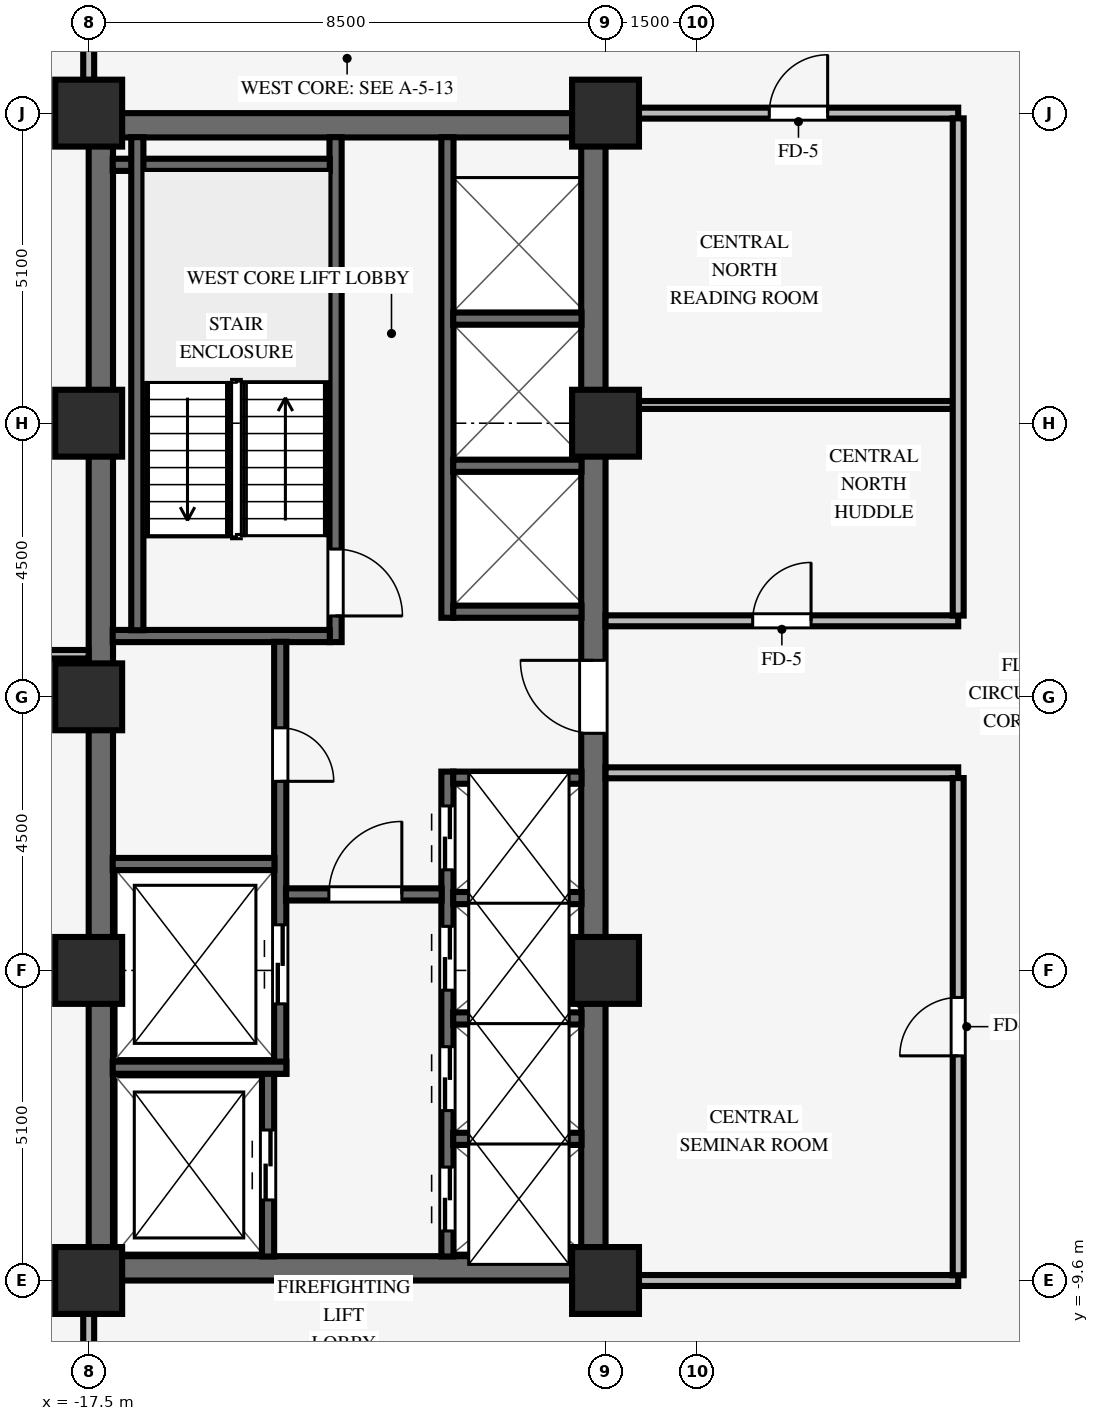
"""IFC4 building model, lengths in metres.
Left out: names, types, materials, properties, quantities, classifications, styles, units other than length and angle.
Written with IfcOpenShell. Run it as: python <this file> out.ifc"""

import sys

from ifc_helpers import new_model, si_unit, direction, frame, frame_2d, origin, origin_2d, place, context, subcontext, project, spatial, rectangle, extrude, source, transform, mapped, element, fill, save


model = new_model("IFC4")
c1 = context("Model", 3, precision=1e-05, world=origin(), true_north=direction((0.0, 1.0)))
c2 = subcontext(c1, "Body", "Model", "MODEL_VIEW")
j1 = project(units=[si_unit("LENGTHUNIT", "METRE"), si_unit("PLANEANGLEUNIT", "RADIAN")], contexts=[c1])
p1 = place(None, origin())
s1 = spatial("IfcSite", under=j1, at=p1, CompositionType="ELEMENT")
p2 = place(p1, origin())
s2 = spatial("IfcBuilding", under=s1, at=p2, CompositionType="ELEMENT")
p3 = place(p2, frame((0.0, 0.0, 101.95)))
s3 = spatial("IfcBuildingStorey", under=s2, at=p3, CompositionType="ELEMENT", Elevation=101.95)
for number, where, z_axis, x_axis in (
    (1, (-17.5, -9.4, 0.0), (0.0, 0.0, 1.0), (1.0, 0.0, 0.0)),
    (2, (-17.5, 9.4, 0.0), (0.0, 0.0, 1.0), (1.0, 0.0, 0.0)),
):
    element("IfcWall", number, at=place(p3, frame(where, z_axis=z_axis, x_axis=x_axis)), inside=s3, PredefinedType="SHEAR", context=c2, shape_type="SweptSolid", body=[
        extrude(rectangle(XDim=8.5, YDim=0.4, at=frame_2d((4.25, 0.0))), origin(), (0.0, 0.0, 1.0), 3.37),
    ])
p4 = place(p3, frame((-17.3, -9.205, 0.0), z_axis=(0.0, 0.0, 1.0), x_axis=(0.0, 1.0, 0.0)))
e3 = element("IfcWall", 3, at=p4, inside=s3, PredefinedType="SHEAR", context=c2, shape_type="SweptSolid", body=[
    extrude(rectangle(XDim=18.41, YDim=0.4, at=frame_2d((9.205, 0.0))), origin(), (0.0, 0.0, 1.0), 3.37),
])
p5 = place(p3, frame((-9.2, -9.205, 0.0), z_axis=(0.0, 0.0, 1.0), x_axis=(0.0, 1.0, 0.0)))
e4 = element("IfcWall", 4, at=p5, inside=s3, PredefinedType="SHEAR", context=c2, shape_type="SweptSolid", body=[
    extrude(rectangle(XDim=18.41, YDim=0.4, at=frame_2d((9.205, 0.0))), origin(), (0.0, 0.0, 1.0), 3.37),
])
p6 = place(p5, frame((8.605, 0.0, 0.0)))
e5 = element("IfcOpeningElement", 5, at=p6, cuts=e4, PredefinedType="OPENING", context=c2, shape_type="SweptSolid", body=[
    extrude(rectangle(XDim=1.2, YDim=2.15, at=frame_2d((0.6, 1.075))), frame((0.0, 0.21, 0.0), z_axis=(0.0, -1.0, 0.0), x_axis=(1.0, 0.0, 0.0)), (0.0, 0.0, 1.0), 0.42),
])
for number, where, z_axis, x_axis in (
    (6, (-17.5, -9.6, 0.0), (0.0, 0.0, 1.0), (1.0, 0.0, 0.0)),
    (7, (-17.5, -4.5, 0.0), (0.0, 0.0, 1.0), (1.0, 0.0, 0.0)),
    (8, (-17.5, 4.5, 0.0), (0.0, 0.0, 1.0), (1.0, 0.0, 0.0)),
    (9, (-17.5, 9.6, 0.0), (0.0, 0.0, 1.0), (1.0, 0.0, 0.0)),
    (10, (-9.0, -9.6, 0.0), (0.0, 0.0, 1.0), (1.0, 0.0, 0.0)),
    (11, (-9.0, -4.5, 0.0), (0.0, 0.0, 1.0), (1.0, 0.0, 0.0)),
    (12, (-9.0, 4.5, 0.0), (0.0, 0.0, 1.0), (1.0, 0.0, 0.0)),
    (13, (-9.0, 9.6, 0.0), (0.0, 0.0, 1.0), (1.0, 0.0, 0.0)),
    (14, (-17.5, 0.0, 0.0), (0.0, 0.0, 1.0), (1.0, 0.0, 0.0)),
):
    element("IfcColumn", number, at=place(p3, frame(where, z_axis=z_axis, x_axis=x_axis)), inside=s3, PredefinedType="COLUMN", context=c2, shape_type="SweptSolid", body=[
        extrude(rectangle(XDim=1.1, YDim=1.1, at=origin_2d()), origin(), (0.0, 0.0, 1.0), 3.37),
    ])
p7 = place(p3, frame((-13.44, 0.9, 0.0), z_axis=(0.0, 0.0, 1.0), x_axis=(0.0, 1.0, 0.0)))
e15 = element("IfcWall", 15, at=p7, inside=s3, PredefinedType="SHEAR", context=c2, shape_type="SweptSolid", body=[
    extrude(rectangle(XDim=8.305, YDim=0.2, at=frame_2d((4.153, 0.0))), origin(), (0.0, 0.0, 1.0), 3.37),
])
p8 = place(p7, frame((1.53, 0.0, 0.0), z_axis=(0.0, 0.0, 1.0), x_axis=(-1.0, 0.0, 0.0)))
e16 = element("IfcOpeningElement", 16, at=p8, cuts=e15, PredefinedType="OPENING", context=c2, shape_type="SweptSolid", body=[
    extrude(rectangle(XDim=1.1, YDim=2.15, at=frame_2d((0.55, 1.075))), frame((0.0, 0.11, 0.0), z_axis=(0.0, -1.0, 0.0), x_axis=(1.0, 0.0, 0.0)), (0.0, 0.0, 1.0), 0.22),
])
for number, where, z_axis, x_axis in (
    (17, (-17.105, 1.0, 0.0), (0.0, 0.0, 1.0), (1.0, 0.0, 0.0)),
    (18, (-17.105, 8.75, 0.0), (0.0, 0.0, 1.0), (1.0, 0.0, 0.0)),
):
    element("IfcWall", number, at=place(p3, frame(where, z_axis=z_axis, x_axis=x_axis)), inside=s3, PredefinedType="SHEAR", context=c2, shape_type="SweptSolid", body=[
        extrude(rectangle(XDim=3.57, YDim=0.2, at=frame_2d((1.785, 0.0))), origin(), (0.0, 0.0, 1.0), 3.37),
    ])
p9 = place(p3, frame((-16.7, 1.095, 0.0), z_axis=(0.0, 0.0, 1.0), x_axis=(0.0, 1.0, 0.0)))
e19 = element("IfcWall", 19, at=p9, inside=s3, PredefinedType="SHEAR", context=c2, shape_type="SweptSolid", body=[
    extrude(rectangle(XDim=8.11, YDim=0.2, at=frame_2d((4.055, 0.0))), origin(), (0.0, 0.0, 1.0), 3.37),
])
p10 = place(p3, frame((-14.55, -9.205, 0.0), z_axis=(0.0, 0.0, 1.0), x_axis=(0.0, 1.0, 0.0)))
e20 = element("IfcWall", 20, at=p10, inside=s3, PredefinedType="SHEAR", context=c2, shape_type="SweptSolid", body=[
    extrude(rectangle(XDim=3.01, YDim=0.2, at=frame_2d((1.505, 0.0))), origin(), (0.0, 0.0, 1.0), 3.37),
])
p11 = place(p10, frame((0.93, 0.0, 0.0)))
e21 = element("IfcOpeningElement", 21, at=p11, cuts=e20, PredefinedType="OPENING", context=c2, shape_type="SweptSolid", body=[
    extrude(rectangle(XDim=1.15, YDim=2.15, at=frame_2d((0.575, 1.075))), frame((0.0, 0.11, 0.0), z_axis=(0.0, -1.0, 0.0), x_axis=(1.0, 0.0, 0.0)), (0.0, 0.0, 1.0), 0.22),
])
p12 = place(p3, frame((-14.35, -6.2, 0.0), z_axis=(0.0, 0.0, 1.0), x_axis=(0.0, 1.0, 0.0)))
e22 = element("IfcWall", 22, at=p12, inside=s3, PredefinedType="SHEAR", context=c2, shape_type="SweptSolid", body=[
    extrude(rectangle(XDim=7.105, YDim=0.2, at=frame_2d((3.552, 0.0))), origin(), (0.0, 0.0, 1.0), 3.37),
])
p13 = place(p12, frame((5.69, 0.0, 0.0), z_axis=(0.0, 0.0, 1.0), x_axis=(-1.0, 0.0, 0.0)))
e23 = element("IfcOpeningElement", 23, at=p13, cuts=e22, PredefinedType="OPENING", context=c2, shape_type="SweptSolid", body=[
    extrude(rectangle(XDim=0.88, YDim=2.1, at=frame_2d((0.44, 1.05))), frame((0.0, 0.11, 0.0), z_axis=(0.0, -1.0, 0.0), x_axis=(1.0, 0.0, 0.0)), (0.0, 0.0, 1.0), 0.22),
])
p14 = place(p12, frame((1.15, 0.0, 0.0)))
e24 = element("IfcOpeningElement", 24, at=p14, cuts=e22, PredefinedType="OPENING", context=c2, shape_type="SweptSolid", body=[
    extrude(rectangle(XDim=1.3, YDim=2.2, at=frame_2d((0.65, 1.1))), frame((0.0, 0.11, 0.0), z_axis=(0.0, -1.0, 0.0), x_axis=(1.0, 0.0, 0.0)), (0.0, 0.0, 1.0), 0.22),
])
p15 = place(p3, frame((-17.105, -6.1, 0.0), z_axis=(0.0, 0.0, 1.0), x_axis=(1.0, 0.0, 0.0)))
e25 = element("IfcWall", 25, at=p15, inside=s3, PredefinedType="SHEAR", context=c2, shape_type="SweptSolid", body=[
    extrude(rectangle(XDim=2.855, YDim=0.2, at=frame_2d((1.427, 0.0))), origin(), (0.0, 0.0, 1.0), 3.37),
])
p16 = place(p3, frame((-17.105, -2.75, 0.0), z_axis=(0.0, 0.0, 1.0), x_axis=(1.0, 0.0, 0.0)))
e26 = element("IfcWall", 26, at=p16, inside=s3, PredefinedType="SHEAR", context=c2, shape_type="SweptSolid", body=[
    extrude(rectangle(XDim=2.66, YDim=0.2, at=frame_2d((1.33, 0.0))), origin(), (0.0, 0.0, 1.0), 3.37),
])
p17 = place(p3, frame((-11.6, -9.205, 0.0), z_axis=(0.0, 0.0, 1.0), x_axis=(0.0, 1.0, 0.0)))
e27 = element("IfcWall", 27, at=p17, inside=s3, PredefinedType="SHEAR", context=c2, shape_type="SweptSolid", body=[
    extrude(rectangle(XDim=7.975, YDim=0.2, at=frame_2d((3.988, 0.0))), origin(), (0.0, 0.0, 1.0), 3.37),
])
p18 = place(p17, frame((0.42, 0.0, 0.0)))
e28 = element("IfcOpeningElement", 28, at=p18, cuts=e27, PredefinedType="OPENING", context=c2, shape_type="SweptSolid", body=[
    extrude(rectangle(XDim=1.05, YDim=2.15, at=frame_2d((0.525, 1.075))), frame((0.0, 0.11, 0.0), z_axis=(0.0, -1.0, 0.0), x_axis=(1.0, 0.0, 0.0)), (0.0, 0.0, 1.0), 0.22),
])
p19 = place(p17, frame((2.4, 0.0, 0.0)))
e29 = element("IfcOpeningElement", 29, at=p19, cuts=e27, PredefinedType="OPENING", context=c2, shape_type="SweptSolid", body=[
    extrude(rectangle(XDim=1.05, YDim=2.15, at=frame_2d((0.525, 1.075))), frame((0.0, 0.11, 0.0), z_axis=(0.0, -1.0, 0.0), x_axis=(1.0, 0.0, 0.0)), (0.0, 0.0, 1.0), 0.22),
])
p20 = place(p17, frame((4.38, 0.0, 0.0)))
e30 = element("IfcOpeningElement", 30, at=p20, cuts=e27, PredefinedType="OPENING", context=c2, shape_type="SweptSolid", body=[
    extrude(rectangle(XDim=1.05, YDim=2.15, at=frame_2d((0.525, 1.075))), frame((0.0, 0.11, 0.0), z_axis=(0.0, -1.0, 0.0), x_axis=(1.0, 0.0, 0.0)), (0.0, 0.0, 1.0), 0.22),
])
p21 = place(p17, frame((6.36, 0.0, 0.0)))
e31 = element("IfcOpeningElement", 31, at=p21, cuts=e27, PredefinedType="OPENING", context=c2, shape_type="SweptSolid", body=[
    extrude(rectangle(XDim=1.05, YDim=2.15, at=frame_2d((0.525, 1.075))), frame((0.0, 0.11, 0.0), z_axis=(0.0, -1.0, 0.0), x_axis=(1.0, 0.0, 0.0)), (0.0, 0.0, 1.0), 0.22),
])
p22 = place(p3, frame((-14.255, -3.25, 0.0), z_axis=(0.0, 0.0, 1.0), x_axis=(1.0, 0.0, 0.0)))
e32 = element("IfcWall", 32, at=p22, inside=s3, PredefinedType="SHEAR", context=c2, shape_type="SweptSolid", body=[
    extrude(rectangle(XDim=2.56, YDim=0.2, at=frame_2d((1.28, 0.0))), origin(), (0.0, 0.0, 1.0), 3.37),
])
p23 = place(p22, frame((0.705, 0.0, 0.0)))
e33 = element("IfcOpeningElement", 33, at=p23, cuts=e32, PredefinedType="OPENING", context=c2, shape_type="SweptSolid", body=[
    extrude(rectangle(XDim=1.2, YDim=2.15, at=frame_2d((0.6, 1.075))), frame((0.0, 0.11, 0.0), z_axis=(0.0, -1.0, 0.0), x_axis=(1.0, 0.0, 0.0)), (0.0, 0.0, 1.0), 0.22),
])
for number, where, z_axis, x_axis in (
    (34, (-11.505, -7.27, 0.0), (0.0, 0.0, 1.0), (1.0, 0.0, 0.0)),
    (35, (-11.505, -5.29, 0.0), (0.0, 0.0, 1.0), (1.0, 0.0, 0.0)),
    (36, (-11.505, -3.31, 0.0), (0.0, 0.0, 1.0), (1.0, 0.0, 0.0)),
    (37, (-11.505, -1.33, 0.0), (0.0, 0.0, 1.0), (1.0, 0.0, 0.0)),
):
    element("IfcWall", number, at=place(p3, frame(where, z_axis=z_axis, x_axis=x_axis)), inside=s3, PredefinedType="SHEAR", context=c2, shape_type="SweptSolid", body=[
        extrude(rectangle(XDim=2.11, YDim=0.2, at=frame_2d((1.055, 0.0))), origin(), (0.0, 0.0, 1.0), 3.37),
    ])
p24 = place(p3, frame((-11.6, 1.3, 0.0), z_axis=(0.0, 0.0, 1.0), x_axis=(0.0, 1.0, 0.0)))
e38 = element("IfcWall", 38, at=p24, inside=s3, PredefinedType="SHEAR", context=c2, shape_type="SweptSolid", body=[
    extrude(rectangle(XDim=7.905, YDim=0.2, at=frame_2d((3.953, 0.0))), origin(), (0.0, 0.0, 1.0), 3.37),
])
for number, where, z_axis, x_axis in (
    (39, (-11.505, 1.4, 0.0), (0.0, 0.0, 1.0), (1.0, 0.0, 0.0)),
    (40, (-11.505, 3.8, 0.0), (0.0, 0.0, 1.0), (1.0, 0.0, 0.0)),
    (41, (-11.505, 6.22, 0.0), (0.0, 0.0, 1.0), (1.0, 0.0, 0.0)),
):
    element("IfcWall", number, at=place(p3, frame(where, z_axis=z_axis, x_axis=x_axis)), inside=s3, PredefinedType="SHEAR", context=c2, shape_type="SweptSolid", body=[
        extrude(rectangle(XDim=2.11, YDim=0.2, at=frame_2d((1.055, 0.0))), origin(), (0.0, 0.0, 1.0), 3.37),
    ])
p25 = place(p3, frame((-8.454, -9.6, 0.0), z_axis=(0.0, 0.0, 1.0), x_axis=(1.0, 0.0, 0.0)))
e42 = element("IfcWall", 42, at=p25, inside=s3, PredefinedType="PARTITIONING", context=c2, shape_type="SweptSolid", body=[
    extrude(rectangle(XDim=5.254, YDim=0.18, at=frame_2d((2.627, 0.0))), origin(), (0.0, 0.0, 1.0), 2.405),
])
p26 = place(p3, frame((-9.0, -1.25, 0.0), z_axis=(0.0, 0.0, 1.0), x_axis=(1.0, 0.0, 0.0)))
e43 = element("IfcWall", 43, at=p26, inside=s3, PredefinedType="PARTITIONING", context=c2, shape_type="SweptSolid", body=[
    extrude(rectangle(XDim=5.8, YDim=0.18, at=frame_2d((2.9, 0.0))), origin(), (0.0, 0.0, 1.0), 3.36),
])
p27 = place(p3, frame((-23.68, 0.7, 0.0), z_axis=(0.0, 0.0, 1.0), x_axis=(1.0, 0.0, 0.0)))
e44 = element("IfcWall", 44, at=p27, inside=s3, PredefinedType="PARTITIONING", context=c2, shape_type="SweptSolid", body=[
    extrude(rectangle(XDim=6.18, YDim=0.14, at=frame_2d((3.09, 0.0))), origin(), (0.0, 0.0, 1.0), 3.36),
])
p28 = place(p3, frame((-9.0, 1.25, 0.0), z_axis=(0.0, 0.0, 1.0), x_axis=(1.0, 0.0, 0.0)))
e45 = element("IfcWall", 45, at=p28, inside=s3, PredefinedType="PARTITIONING", context=c2, shape_type="SweptSolid", body=[
    extrude(rectangle(XDim=5.8, YDim=0.18, at=frame_2d((2.9, 0.0))), origin(), (0.0, 0.0, 1.0), 3.36),
])
p29 = place(p28, frame((2.42, 0.0, 0.0)))
e46 = element("IfcOpeningElement", 46, at=p29, cuts=e45, PredefinedType="OPENING", context=c2, shape_type="SweptSolid", body=[
    extrude(rectangle(XDim=0.96, YDim=2.1, at=frame_2d((0.48, 1.05))), frame((0.0, 0.1, 0.0), z_axis=(0.0, -1.0, 0.0), x_axis=(1.0, 0.0, 0.0)), (0.0, 0.0, 1.0), 0.2),
])
p30 = place(p3, frame((-8.454, 4.8, 0.0), z_axis=(0.0, 0.0, 1.0), x_axis=(1.0, 0.0, 0.0)))
e47 = element("IfcWall", 47, at=p30, inside=s3, PredefinedType="PARTITIONING", context=c2, shape_type="SweptSolid", body=[
    extrude(rectangle(XDim=5.168, YDim=0.13, at=frame_2d((2.584, 0.0))), origin(), (0.0, 0.0, 1.0), 2.738),
])
p31 = place(p3, frame((-8.454, 9.6, 0.0), z_axis=(0.0, 0.0, 1.0), x_axis=(1.0, 0.0, 0.0)))
e48 = element("IfcWall", 48, at=p31, inside=s3, PredefinedType="PARTITIONING", context=c2, shape_type="SweptSolid", body=[
    extrude(rectangle(XDim=5.254, YDim=0.18, at=frame_2d((2.627, 0.0))), origin(), (0.0, 0.0, 1.0), 2.405),
])
p32 = place(p31, frame((2.147, 0.0, 0.0)))
e49 = element("IfcOpeningElement", 49, at=p32, cuts=e48, PredefinedType="OPENING", context=c2, shape_type="SweptSolid", body=[
    extrude(rectangle(XDim=0.96, YDim=2.1, at=frame_2d((0.48, 1.05))), frame((0.0, 0.1, 0.0), z_axis=(0.0, -1.0, 0.0), x_axis=(1.0, 0.0, 0.0)), (0.0, 0.0, 1.0), 0.2),
])
for number, where, z_axis, x_axis in (
    (50, (-17.5, -11.114, 0.0), (0.0, 0.0, 1.0), (0.0, 1.0, 0.0)),
    (51, (-17.5, 10.146, 0.0), (0.0, 0.0, 1.0), (0.0, 1.0, 0.0)),
):
    element("IfcWall", number, at=place(p3, frame(where, z_axis=z_axis, x_axis=x_axis)), inside=s3, PredefinedType="PARTITIONING", context=c2, shape_type="SweptSolid", body=[
        extrude(rectangle(XDim=0.968, YDim=0.18, at=frame_2d((0.484, 0.0))), origin(), (0.0, 0.0, 1.0), 2.738),
    ])
p33 = place(p3, frame((-3.2, -9.514, 0.0), z_axis=(0.0, 0.0, 1.0), x_axis=(0.0, 1.0, 0.0)))
e52 = element("IfcWall", 52, at=p33, inside=s3, PredefinedType="PARTITIONING", context=c2, shape_type="SweptSolid", body=[
    extrude(rectangle(XDim=8.178, YDim=0.18, at=frame_2d((4.089, 0.0))), origin(), (0.0, 0.0, 1.0), 3.36),
])
p34 = place(p33, frame((3.609, 0.0, 0.0)))
e53 = element("IfcOpeningElement", 53, at=p34, cuts=e52, PredefinedType="OPENING", context=c2, shape_type="SweptSolid", body=[
    extrude(rectangle(XDim=0.96, YDim=2.1, at=frame_2d((0.48, 1.05))), frame((0.0, 0.1, 0.0), z_axis=(0.0, -1.0, 0.0), x_axis=(1.0, 0.0, 0.0)), (0.0, 0.0, 1.0), 0.2),
])
p35 = place(p3, frame((-3.2, 1.336, 0.0), z_axis=(0.0, 0.0, 1.0), x_axis=(0.0, 1.0, 0.0)))
e54 = element("IfcWall", 54, at=p35, inside=s3, PredefinedType="PARTITIONING", context=c2, shape_type="SweptSolid", body=[
    extrude(rectangle(XDim=8.178, YDim=0.18, at=frame_2d((4.089, 0.0))), origin(), (0.0, 0.0, 1.0), 3.36),
])
m1 = source(origin(), c2, "Body", "SweptSolid", [
    extrude(rectangle(XDim=1.1, YDim=2.15, at=frame_2d((0.55, 1.075))), frame((0.0, 0.025, 0.0), z_axis=(0.0, -1.0, 0.0), x_axis=(1.0, 0.0, 0.0)), (0.0, 0.0, 1.0), 0.05),
])
p36 = place(p8, origin())
e55 = element("IfcDoor", 55, at=p36, inside=s3, OperationType="SINGLE_SWING_RIGHT", PredefinedType="DOOR", context=c2, shape_type="MappedRepresentation", body=[
    mapped(m1, transform((0.0, 0.0, 0.0), scale=1.0)),
])
fill(e16, e55)
m2 = source(origin(), c2, "Body", "SweptSolid", [
    extrude(rectangle(XDim=0.88, YDim=2.1, at=frame_2d((0.44, 1.05))), frame((0.0, 0.025, 0.0), z_axis=(0.0, -1.0, 0.0), x_axis=(1.0, 0.0, 0.0)), (0.0, 0.0, 1.0), 0.05),
])
p37 = place(p13, origin())
e56 = element("IfcDoor", 56, at=p37, inside=s3, OperationType="SINGLE_SWING_RIGHT", PredefinedType="DOOR", context=c2, shape_type="MappedRepresentation", body=[
    mapped(m2, transform((0.0, 0.0, 0.0), scale=1.0)),
])
fill(e23, e56)
m3 = source(origin(), c2, "Body", "SweptSolid", [
    extrude(rectangle(XDim=1.2, YDim=2.15, at=frame_2d((0.6, 1.075))), frame((0.0, 0.025, 0.0), z_axis=(0.0, -1.0, 0.0), x_axis=(1.0, 0.0, 0.0)), (0.0, 0.0, 1.0), 0.05),
])
p38 = place(p23, origin())
e57 = element("IfcDoor", 57, at=p38, inside=s3, OperationType="SINGLE_SWING_RIGHT", PredefinedType="DOOR", context=c2, shape_type="MappedRepresentation", body=[
    mapped(m3, transform((0.0, 0.0, 0.0), scale=1.0)),
])
fill(e33, e57)
p39 = place(p6, origin())
e58 = element("IfcDoor", 58, at=p39, inside=s3, OperationType="SINGLE_SWING_RIGHT", PredefinedType="DOOR", context=c2, shape_type="MappedRepresentation", body=[
    mapped(m3, transform((0.0, 0.0, 0.0), scale=1.0)),
])
fill(e5, e58)
m4 = source(origin(), c2, "Body", "SweptSolid", [
    extrude(rectangle(XDim=1.15, YDim=2.15, at=frame_2d((0.575, 1.075))), frame((0.0, 0.025, 0.0), z_axis=(0.0, -1.0, 0.0), x_axis=(1.0, 0.0, 0.0)), (0.0, 0.0, 1.0), 0.05),
])
p40 = place(p11, origin())
e59 = element("IfcDoor", 59, at=p40, inside=s3, OperationType="DOUBLE_DOOR_SLIDING", PredefinedType="DOOR", context=c2, shape_type="MappedRepresentation", body=[
    mapped(m4, transform((0.0, 0.0, 0.0), scale=1.0)),
])
fill(e21, e59)
m5 = source(origin(), c2, "Body", "SweptSolid", [
    extrude(rectangle(XDim=1.3, YDim=2.2, at=frame_2d((0.65, 1.1))), frame((0.0, 0.025, 0.0), z_axis=(0.0, -1.0, 0.0), x_axis=(1.0, 0.0, 0.0)), (0.0, 0.0, 1.0), 0.05),
])
p41 = place(p14, origin())
e60 = element("IfcDoor", 60, at=p41, inside=s3, OperationType="DOUBLE_DOOR_SLIDING", PredefinedType="DOOR", context=c2, shape_type="MappedRepresentation", body=[
    mapped(m5, transform((0.0, 0.0, 0.0), scale=1.0)),
])
fill(e24, e60)
m6 = source(origin(), c2, "Body", "SweptSolid", [
    extrude(rectangle(XDim=1.05, YDim=2.15, at=frame_2d((0.525, 1.075))), frame((0.0, 0.025, 0.0), z_axis=(0.0, -1.0, 0.0), x_axis=(1.0, 0.0, 0.0)), (0.0, 0.0, 1.0), 0.05),
])
p42 = place(p18, origin())
e61 = element("IfcDoor", 61, at=p42, inside=s3, OperationType="DOUBLE_DOOR_SLIDING", PredefinedType="DOOR", context=c2, shape_type="MappedRepresentation", body=[
    mapped(m6, transform((0.0, 0.0, 0.0), scale=1.0)),
])
fill(e28, e61)
p43 = place(p19, origin())
e62 = element("IfcDoor", 62, at=p43, inside=s3, OperationType="DOUBLE_DOOR_SLIDING", PredefinedType="DOOR", context=c2, shape_type="MappedRepresentation", body=[
    mapped(m6, transform((0.0, 0.0, 0.0), scale=1.0)),
])
fill(e29, e62)
p44 = place(p20, origin())
e63 = element("IfcDoor", 63, at=p44, inside=s3, OperationType="DOUBLE_DOOR_SLIDING", PredefinedType="DOOR", context=c2, shape_type="MappedRepresentation", body=[
    mapped(m6, transform((0.0, 0.0, 0.0), scale=1.0)),
])
fill(e30, e63)
p45 = place(p21, origin())
e64 = element("IfcDoor", 64, at=p45, inside=s3, OperationType="DOUBLE_DOOR_SLIDING", PredefinedType="DOOR", context=c2, shape_type="MappedRepresentation", body=[
    mapped(m6, transform((0.0, 0.0, 0.0), scale=1.0)),
])
fill(e31, e64)
m7 = source(origin(), c2, "Body", "SweptSolid", [
    extrude(rectangle(XDim=0.96, YDim=2.1, at=frame_2d((0.48, 1.05))), frame((0.0, 0.025, 0.0), z_axis=(0.0, -1.0, 0.0), x_axis=(1.0, 0.0, 0.0)), (0.0, 0.0, 1.0), 0.05),
])
p46 = place(p34, origin())
e65 = element("IfcDoor", 65, at=p46, inside=s3, OperationType="SINGLE_SWING_LEFT", PredefinedType="DOOR", context=c2, shape_type="MappedRepresentation", body=[
    mapped(m7, transform((0.0, 0.0, 0.0), scale=1.0)),
])
fill(e53, e65)
p47 = place(p29, origin())
e66 = element("IfcDoor", 66, at=p47, inside=s3, OperationType="SINGLE_SWING_RIGHT", PredefinedType="DOOR", context=c2, shape_type="MappedRepresentation", body=[
    mapped(m7, transform((0.0, 0.0, 0.0), scale=1.0)),
])
fill(e46, e66)
p48 = place(p32, origin())
e67 = element("IfcDoor", 67, at=p48, inside=s3, OperationType="SINGLE_SWING_RIGHT", PredefinedType="DOOR", context=c2, shape_type="MappedRepresentation", body=[
    mapped(m7, transform((0.0, 0.0, 0.0), scale=1.0)),
])
fill(e49, e67)
save(model, sys.argv[1])
